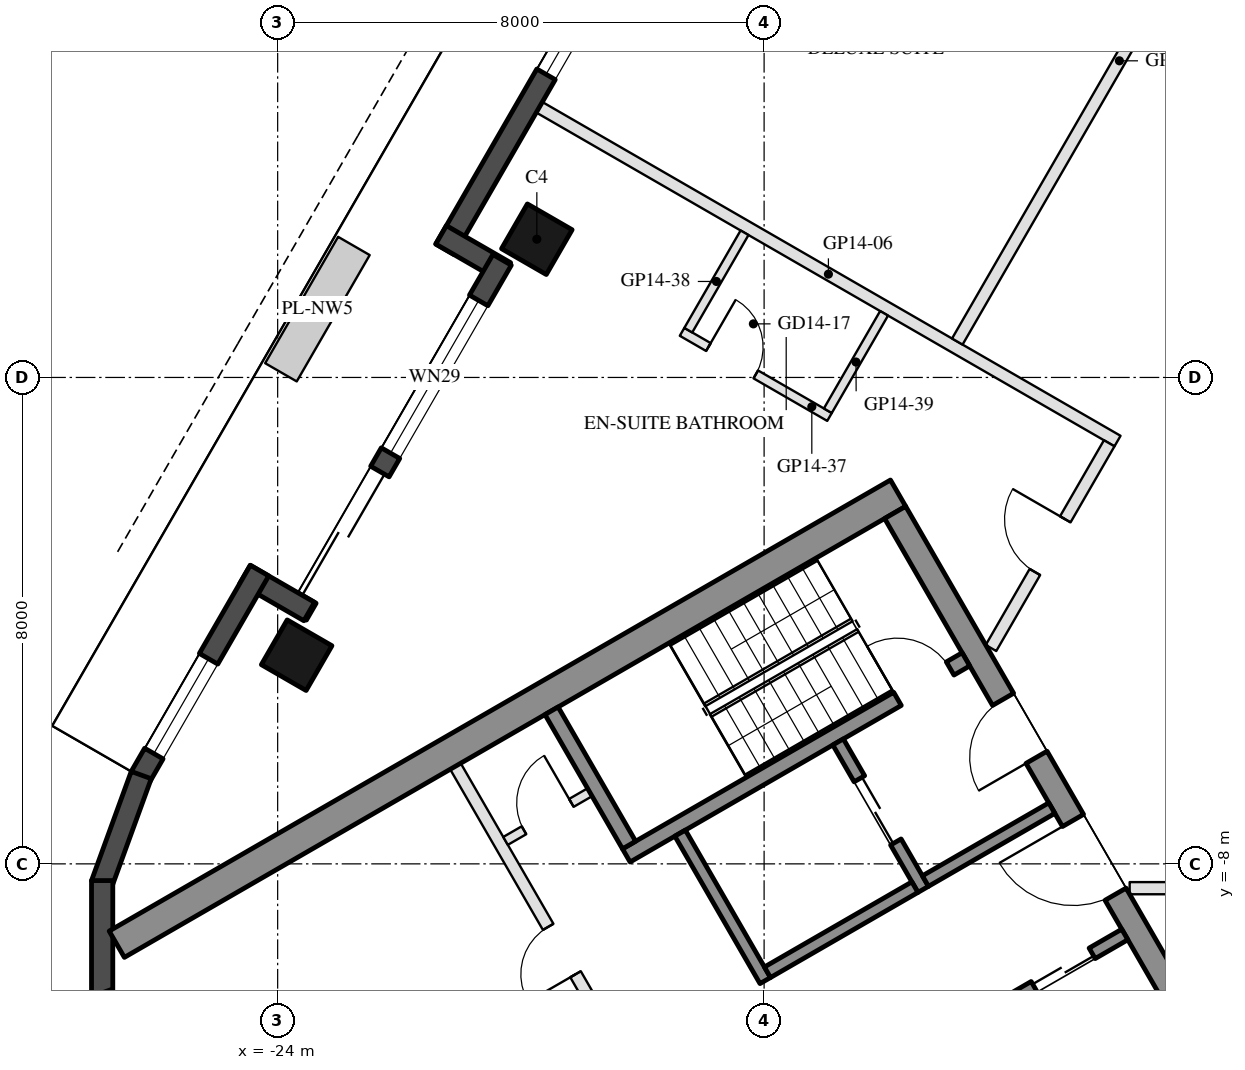
"""IFC4 building model, lengths in metres.
Left out: names, types, materials, properties, quantities, classifications, styles, units other than length and angle.
Written with IfcOpenShell. Run it as: python <this file> out.ifc"""

import sys

from ifc_helpers import new_model, si_unit, direction, frame, frame_2d, origin, origin_2d, place, context, subcontext, project, spatial, rectangle, hollow_rectangle, extrude, element, fill, save


model = new_model("IFC4")
c1 = context("Model", 3, precision=1e-05, world=origin(), true_north=direction((0.0, 1.0)))
c2 = subcontext(c1, "Body", "Model", "MODEL_VIEW")
j1 = project(units=[si_unit("LENGTHUNIT", "METRE"), si_unit("PLANEANGLEUNIT", "RADIAN")], contexts=[c1])
p1 = place(None, origin())
s1 = spatial("IfcSite", under=j1, at=p1, CompositionType="ELEMENT")
p2 = place(p1, origin())
s2 = spatial("IfcBuilding", under=s1, at=p2, CompositionType="ELEMENT")
p3 = place(p2, frame((0.0, 0.0, 161.4)))
s3 = spatial("IfcBuildingStorey", under=s2, at=p3, CompositionType="ELEMENT", Elevation=161.4)
for number, where, z_axis, x_axis in (
    (1, (-19.738, 2.273, 0.0), (0.0, 0.0, 1.0), (0.5, 0.866, 0.0)),
    (2, (-23.688, -4.568, 0.0), (0.0, 0.0, 1.0), (0.5, 0.866, 0.0)),
):
    element("IfcColumn", number, at=place(p3, frame(where, z_axis=z_axis, x_axis=x_axis)), inside=s3, PredefinedType="COLUMN", context=c2, shape_type="SweptSolid", body=[
        extrude(hollow_rectangle(XDim=0.85, YDim=0.85, WallThickness=0.04, at=origin_2d()), origin(), (0.0, 0.0, 1.0), 3.7),
    ])
p4 = place(p3, frame((-16.398, 10.507, 0.0), z_axis=(0.0, 0.0, 1.0), x_axis=(-0.499999142773, -0.866025898704, 0.0)))
e3 = element("IfcWall", 3, at=p4, inside=s3, PredefinedType="SOLIDWALL", context=c2, shape_type="SweptSolid", body=[
    extrude(rectangle(XDim=9.7, YDim=0.35, at=frame_2d((4.85, 0.0))), origin(), (0.0, 0.0, 1.0), 3.55),
])
p5 = place(p4, frame((1.675, 0.0, 0.0)))
e4 = element("IfcOpeningElement", 4, at=p5, cuts=e3, PredefinedType="OPENING", context=c2, shape_type="SweptSolid", body=[
    extrude(rectangle(XDim=2.4, YDim=2.4, at=frame_2d((1.2, 1.2))), frame((0.0, 0.185, 0.0), z_axis=(0.0, -1.0, 0.0), x_axis=(1.0, 0.0, 0.0)), (0.0, 0.0, 1.0), 0.37),
])
p6 = place(p4, frame((4.375, 0.0, 0.3)))
e5 = element("IfcOpeningElement", 5, at=p6, cuts=e3, PredefinedType="OPENING", context=c2, shape_type="SweptSolid", body=[
    extrude(rectangle(XDim=2.0, YDim=2.65, at=frame_2d((1.0, 1.325))), frame((0.0, 0.185, 0.0), z_axis=(0.0, -1.0, 0.0), x_axis=(1.0, 0.0, 0.0)), (0.0, 0.0, 1.0), 0.37),
])
p7 = place(p3, frame((-21.312, 2.346, 0.0), z_axis=(0.0, 0.0, 1.0), x_axis=(0.866005645448, -0.500034220881, 0.0)))
e6 = element("IfcWall", 6, at=p7, inside=s3, PredefinedType="SOLIDWALL", context=c2, shape_type="SweptSolid", body=[
    extrude(rectangle(XDim=1.22, YDim=0.35, at=frame_2d((0.61, 0.0))), origin(), (0.0, 0.0, 1.0), 3.55),
])
p8 = place(p3, frame((-20.309, 1.934, 0.0), z_axis=(0.0, 0.0, 1.0), x_axis=(-0.499992114976, -0.866029956157, 0.0)))
e7 = element("IfcWall", 7, at=p8, inside=s3, PredefinedType="SOLIDWALL", context=c2, shape_type="SweptSolid", body=[
    extrude(rectangle(XDim=6.74, YDim=0.35, at=frame_2d((3.37, 0.0))), origin(), (0.0, 0.0, 1.0), 3.55),
])
p9 = place(p8, frame((4.02, 0.0, 0.0)))
e8 = element("IfcOpeningElement", 8, at=p9, cuts=e7, PredefinedType="OPENING", context=c2, shape_type="SweptSolid", body=[
    extrude(rectangle(XDim=2.4, YDim=2.4, at=frame_2d((1.2, 1.2))), frame((0.0, 0.185, 0.0), z_axis=(0.0, -1.0, 0.0), x_axis=(1.0, 0.0, 0.0)), (0.0, 0.0, 1.0), 0.37),
])
p10 = place(p8, frame((0.77, 0.0, 0.3)))
e9 = element("IfcOpeningElement", 9, at=p10, cuts=e7, PredefinedType="OPENING", context=c2, shape_type="SweptSolid", body=[
    extrude(rectangle(XDim=2.9, YDim=2.65, at=frame_2d((1.45, 1.325))), frame((0.0, 0.185, 0.0), z_axis=(0.0, -1.0, 0.0), x_axis=(1.0, 0.0, 0.0)), (0.0, 0.0, 1.0), 0.37),
])
p11 = place(p3, frame((-23.481, -3.85, 0.0), z_axis=(0.0, 0.0, 1.0), x_axis=(-0.866092288191, 0.499884134912, 0.0)))
e10 = element("IfcWall", 10, at=p11, inside=s3, PredefinedType="SOLIDWALL", context=c2, shape_type="SweptSolid", body=[
    extrude(rectangle(XDim=1.22, YDim=0.35, at=frame_2d((0.61, 0.0))), origin(), (0.0, 0.0, 1.0), 3.55),
])
p12 = place(p3, frame((-24.299, -3.176, 0.0), z_axis=(0.0, 0.0, 1.0), x_axis=(-0.500028278809, -0.866009076391, 0.0)))
e11 = element("IfcWall", 11, at=p12, inside=s3, PredefinedType="SOLIDWALL", context=c2, shape_type="SweptSolid", body=[
    extrude(rectangle(XDim=3.916, YDim=0.35, at=frame_2d((1.958, 0.0))), origin(), (0.0, 0.0, 1.0), 3.55),
])
p13 = place(p12, frame((1.675, 0.0, 0.3)))
e12 = element("IfcOpeningElement", 12, at=p13, cuts=e11, PredefinedType="OPENING", context=c2, shape_type="SweptSolid", body=[
    extrude(rectangle(XDim=1.8, YDim=2.65, at=frame_2d((0.9, 1.325))), frame((0.0, 0.185, 0.0), z_axis=(0.0, -1.0, 0.0), x_axis=(1.0, 0.0, 0.0)), (0.0, 0.0, 1.0), 0.37),
])
for number, where, z_axis, x_axis in (
    (13, (-26.244, -6.54, 0.0), (0.0, 0.0, 1.0), (-0.342, -0.94, 0.0)),
    (14, (-26.886, -8.275, 0.0), (0.0, 0.0, 1.0), (0.0, -1.0, 0.0)),
    (15, (-26.897, -10.125, 0.0), (0.0, 0.0, 1.0), (0.342, -0.94, 0.0)),
):
    element("IfcWall", number, at=place(p3, frame(where, z_axis=z_axis, x_axis=x_axis)), inside=s3, PredefinedType="SOLIDWALL", context=c2, shape_type="SweptSolid", body=[
        extrude(rectangle(XDim=1.91, YDim=0.35, at=frame_2d((0.955, 0.0))), origin(), (0.0, 0.0, 1.0), 3.55),
    ])
p14 = place(p3, frame((-13.797, -1.903, 0.0), z_axis=(0.0, 0.0, 1.0), x_axis=(-0.866025009528, -0.500000682871, 0.0)))
e16 = element("IfcWall", 16, at=p14, inside=s3, PredefinedType="SHEAR", context=c2, shape_type="SweptSolid", body=[
    extrude(rectangle(XDim=14.837, YDim=0.5, at=frame_2d((7.418, 0.0))), origin(), (0.0, 0.0, 1.0), 3.5),
])
p15 = place(p3, frame((-13.845, -2.22, 0.0), z_axis=(0.0, 0.0, 1.0), x_axis=(0.500004234368, -0.866022959057, 0.0)))
e17 = element("IfcWall", 17, at=p15, inside=s3, PredefinedType="SHEAR", context=c2, shape_type="SweptSolid", body=[
    extrude(rectangle(XDim=10.0, YDim=0.4, at=frame_2d((5.0, 0.0))), origin(), (0.0, 0.0, 1.0), 3.5),
])
p16 = place(p15, frame((3.55, 0.0, 0.0)))
e18 = element("IfcOpeningElement", 18, at=p16, cuts=e17, PredefinedType="OPENING", context=c2, shape_type="SweptSolid", body=[
    extrude(rectangle(XDim=1.1, YDim=2.1, at=frame_2d((0.55, 1.05))), frame((0.0, 0.21, 0.0), z_axis=(0.0, -1.0, 0.0), x_axis=(1.0, 0.0, 0.0)), (0.0, 0.0, 1.0), 0.42),
])
p17 = place(p15, frame((5.85, 0.0, 0.0)))
e19 = element("IfcOpeningElement", 19, at=p17, cuts=e17, PredefinedType="OPENING", context=c2, shape_type="SweptSolid", body=[
    extrude(rectangle(XDim=1.4, YDim=2.1, at=frame_2d((0.7, 1.05))), frame((0.0, 0.21, 0.0), z_axis=(0.0, -1.0, 0.0), x_axis=(1.0, 0.0, 0.0)), (0.0, 0.0, 1.0), 0.42),
])
p18 = place(p3, frame((-12.681, -4.636, 0.0), z_axis=(0.0, 0.0, 1.0), x_axis=(-0.866021702275, -0.500006411147, 0.0)))
e20 = element("IfcWall", 20, at=p18, inside=s3, PredefinedType="SHEAR", context=c2, shape_type="SweptSolid", body=[
    extrude(rectangle(XDim=6.45, YDim=0.25, at=frame_2d((3.225, 0.0))), origin(), (0.0, 0.0, 1.0), 3.5),
])
p19 = place(p18, frame((0.3, 0.0, 0.0)))
e21 = element("IfcOpeningElement", 21, at=p19, cuts=e20, PredefinedType="OPENING", context=c2, shape_type="SweptSolid", body=[
    extrude(rectangle(XDim=1.0, YDim=2.1, at=frame_2d((0.5, 1.05))), frame((0.0, 0.135, 0.0), z_axis=(0.0, -1.0, 0.0), x_axis=(1.0, 0.0, 0.0)), (0.0, 0.0, 1.0), 0.27),
])
p20 = place(p3, frame((-19.496, -5.482, 0.0), z_axis=(0.0, 0.0, 1.0), x_axis=(0.499990435942, -0.866030925526, 0.0)))
e22 = element("IfcWall", 22, at=p20, inside=s3, PredefinedType="SHEAR", context=c2, shape_type="SweptSolid", body=[
    extrude(rectangle(XDim=2.55, YDim=0.25, at=frame_2d((1.275, 0.0))), origin(), (0.0, 0.0, 1.0), 3.5),
])
p21 = place(p3, frame((-17.381, -7.495, 0.0), z_axis=(0.0, 0.0, 1.0), x_axis=(0.500011755427, -0.866018616679, 0.0)))
e23 = element("IfcWall", 23, at=p21, inside=s3, PredefinedType="SHEAR", context=c2, shape_type="SweptSolid", body=[
    extrude(rectangle(XDim=2.8, YDim=0.2, at=frame_2d((1.4, 0.0))), origin(), (0.0, 0.0, 1.0), 3.5),
])
p22 = place(p3, frame((-14.783, -5.995, 0.0), z_axis=(0.0, 0.0, 1.0), x_axis=(0.49994636267, -0.866056369097, 0.0)))
e24 = element("IfcWall", 24, at=p22, inside=s3, PredefinedType="SHEAR", context=c2, shape_type="SweptSolid", body=[
    extrude(rectangle(XDim=2.8, YDim=0.2, at=frame_2d((1.4, 0.0))), origin(), (0.0, 0.0, 1.0), 3.5),
])
p23 = place(p22, frame((0.7, 0.0, 0.0)))
e25 = element("IfcOpeningElement", 25, at=p23, cuts=e24, PredefinedType="OPENING", context=c2, shape_type="SweptSolid", body=[
    extrude(rectangle(XDim=1.2, YDim=2.1, at=frame_2d((0.6, 1.05))), frame((0.0, 0.11, 0.0), z_axis=(0.0, -1.0, 0.0), x_axis=(1.0, 0.0, 0.0)), (0.0, 0.0, 1.0), 0.22),
])
p24 = place(p3, frame((-13.52, -8.383, 0.0), z_axis=(0.0, 0.0, 1.0), x_axis=(-0.866034573852, -0.49998411664, 0.0)))
e26 = element("IfcWall", 26, at=p24, inside=s3, PredefinedType="SHEAR", context=c2, shape_type="SweptSolid", body=[
    extrude(rectangle(XDim=2.8, YDim=0.2, at=frame_2d((1.4, 0.0))), origin(), (0.0, 0.0, 1.0), 3.5),
])
p25 = place(p3, frame((-11.268, -7.083, 0.0), z_axis=(0.0, 0.0, 1.0), x_axis=(-0.866050077142, -0.499957262057, 0.0)))
e27 = element("IfcWall", 27, at=p25, inside=s3, PredefinedType="SHEAR", context=c2, shape_type="SweptSolid", body=[
    extrude(rectangle(XDim=2.4, YDim=0.2, at=frame_2d((1.2, 0.0))), origin(), (0.0, 0.0, 1.0), 3.5),
])
p26 = place(p3, frame((-10.068, -9.162, 0.0), z_axis=(0.0, 0.0, 1.0), x_axis=(-0.866032725843, -0.499987317609, 0.0)))
e28 = element("IfcWall", 28, at=p26, inside=s3, PredefinedType="SHEAR", context=c2, shape_type="SweptSolid", body=[
    extrude(rectangle(XDim=10.16, YDim=0.2, at=frame_2d((5.08, 0.0))), origin(), (0.0, 0.0, 1.0), 3.5),
])
p27 = place(p26, frame((0.62, 0.0, 0.0)))
e29 = element("IfcOpeningElement", 29, at=p27, cuts=e28, PredefinedType="OPENING", context=c2, shape_type="SweptSolid", body=[
    extrude(rectangle(XDim=1.1, YDim=2.1, at=frame_2d((0.55, 1.05))), frame((0.0, 0.11, 0.0), z_axis=(0.0, -1.0, 0.0), x_axis=(1.0, 0.0, 0.0)), (0.0, 0.0, 1.0), 0.22),
])
p28 = place(p26, frame((3.16, 0.0, 0.0)))
e30 = element("IfcOpeningElement", 30, at=p28, cuts=e28, PredefinedType="OPENING", context=c2, shape_type="SweptSolid", body=[
    extrude(rectangle(XDim=1.1, YDim=2.1, at=frame_2d((0.55, 1.05))), frame((0.0, 0.11, 0.0), z_axis=(0.0, -1.0, 0.0), x_axis=(1.0, 0.0, 0.0)), (0.0, 0.0, 1.0), 0.22),
])
p29 = place(p26, frame((5.7, 0.0, 0.0)))
e31 = element("IfcOpeningElement", 31, at=p29, cuts=e28, PredefinedType="OPENING", context=c2, shape_type="SweptSolid", body=[
    extrude(rectangle(XDim=1.1, YDim=2.1, at=frame_2d((0.55, 1.05))), frame((0.0, 0.11, 0.0), z_axis=(0.0, -1.0, 0.0), x_axis=(1.0, 0.0, 0.0)), (0.0, 0.0, 1.0), 0.22),
])
p30 = place(p26, frame((8.24, 0.0, 0.0)))
e32 = element("IfcOpeningElement", 32, at=p30, cuts=e28, PredefinedType="OPENING", context=c2, shape_type="SweptSolid", body=[
    extrude(rectangle(XDim=1.1, YDim=2.1, at=frame_2d((0.55, 1.05))), frame((0.0, 0.11, 0.0), z_axis=(0.0, -1.0, 0.0), x_axis=(1.0, 0.0, 0.0)), (0.0, 0.0, 1.0), 0.22),
])
p31 = place(p3, frame((-21.076, -6.395, 0.0), z_axis=(0.0, 0.0, 1.0), x_axis=(0.50001468107, -0.866016927499, 0.0)))
e33 = element("IfcWall", 33, at=p31, inside=s3, PredefinedType="PARTITIONING", context=c2, shape_type="SweptSolid", body=[
    extrude(rectangle(XDim=5.4, YDim=0.2, at=frame_2d((2.7, 0.0))), origin(), (0.0, 0.0, 1.0), 3.5),
])
p32 = place(p31, frame((3.05, 0.0, 0.0)))
e34 = element("IfcOpeningElement", 34, at=p32, cuts=e33, PredefinedType="OPENING", context=c2, shape_type="SweptSolid", body=[
    extrude(rectangle(XDim=0.9, YDim=2.1, at=frame_2d((0.45, 1.05))), frame((0.0, 0.11, 0.0), z_axis=(0.0, -1.0, 0.0), x_axis=(1.0, 0.0, 0.0)), (0.0, 0.0, 1.0), 0.22),
])
p33 = place(p3, frame((-18.866, -6.822, 0.0), z_axis=(0.0, 0.0, 1.0), x_axis=(-0.866028054938, -0.499995408039, 0.0)))
e35 = element("IfcWall", 35, at=p33, inside=s3, PredefinedType="PARTITIONING", context=c2, shape_type="SweptSolid", body=[
    extrude(rectangle(XDim=1.6, YDim=0.15, at=frame_2d((0.8, 0.0))), origin(), (0.0, 0.0, 1.0), 3.5),
])
p34 = place(p33, frame((0.35, 0.0, 0.0)))
e36 = element("IfcOpeningElement", 36, at=p34, cuts=e35, PredefinedType="OPENING", context=c2, shape_type="SweptSolid", body=[
    extrude(rectangle(XDim=0.9, YDim=2.1, at=frame_2d((0.45, 1.05))), frame((0.0, 0.085, 0.0), z_axis=(0.0, -1.0, 0.0), x_axis=(1.0, 0.0, 0.0)), (0.0, 0.0, 1.0), 0.17),
])
p35 = place(p3, frame((-19.697, 4.444, 0.0), z_axis=(0.0, 0.0, 1.0), x_axis=(0.866027479907, -0.499996404033, 0.0)))
e37 = element("IfcWall", 37, at=p35, inside=s3, PredefinedType="PARTITIONING", context=c2, shape_type="SweptSolid", body=[
    extrude(rectangle(XDim=10.98, YDim=0.2, at=frame_2d((5.49, 0.0))), origin(), (0.0, 0.0, 1.0), 3.06),
])
p36 = place(p3, frame((-6.112, -8.4, 0.0), z_axis=(0.0, 0.0, 1.0), x_axis=(-1.0, 0.0, 0.0)))
e38 = element("IfcWall", 38, at=p36, inside=s3, PredefinedType="PARTITIONING", context=c2, shape_type="SweptSolid", body=[
    extrude(rectangle(XDim=3.876, YDim=0.2, at=frame_2d((1.938, 0.0))), origin(), (0.0, 0.0, 1.0), 2.95),
])
p37 = place(p36, frame((1.438, 0.0, 0.0)))
e39 = element("IfcOpeningElement", 39, at=p37, cuts=e38, PredefinedType="OPENING", context=c2, shape_type="SweptSolid", body=[
    extrude(rectangle(XDim=1.0, YDim=2.1, at=frame_2d((0.5, 1.05))), frame((0.0, 0.11, 0.0), z_axis=(0.0, -1.0, 0.0), x_axis=(1.0, 0.0, 0.0)), (0.0, 0.0, 1.0), 0.22),
])
p38 = place(p3, frame((-12.823, 0.591, 0.0), z_axis=(0.0, 0.0, 1.0), x_axis=(0.500005210312, 0.866022395588, 0.0)))
e40 = element("IfcWall", 40, at=p38, inside=s3, PredefinedType="PARTITIONING", context=c2, shape_type="SweptSolid", body=[
    extrude(rectangle(XDim=10.663, YDim=0.2, at=frame_2d((5.332, 0.0))), origin(), (0.0, 0.0, 1.0), 2.95),
])
p39 = place(p38, frame((7.201, 0.0, 0.0)))
e41 = element("IfcOpeningElement", 41, at=p39, cuts=e40, PredefinedType="OPENING", context=c2, shape_type="SweptSolid", body=[
    extrude(rectangle(XDim=1.0, YDim=2.1, at=frame_2d((0.5, 1.05))), frame((0.0, 0.11, 0.0), z_axis=(0.0, -1.0, 0.0), x_axis=(1.0, 0.0, 0.0)), (0.0, 0.0, 1.0), 0.22),
])
p40 = place(p3, frame((-12.269, -4.45, 0.0), z_axis=(0.0, 0.0, 1.0), x_axis=(0.500008716408, 0.866020371305, 0.0)))
e42 = element("IfcWall", 42, at=p40, inside=s3, PredefinedType="PARTITIONING", context=c2, shape_type="SweptSolid", body=[
    extrude(rectangle(XDim=3.888, YDim=0.2, at=frame_2d((1.944, 0.0))), origin(), (0.0, 0.0, 1.0), 2.95),
])
p41 = place(p40, frame((1.444, 0.0, 0.0)))
e43 = element("IfcOpeningElement", 43, at=p41, cuts=e42, PredefinedType="OPENING", context=c2, shape_type="SweptSolid", body=[
    extrude(rectangle(XDim=1.0, YDim=2.1, at=frame_2d((0.5, 1.05))), frame((0.0, 0.11, 0.0), z_axis=(0.0, -1.0, 0.0), x_axis=(1.0, 0.0, 0.0)), (0.0, 0.0, 1.0), 0.22),
])
p42 = place(p3, frame((-17.349, 0.75, 0.0), z_axis=(0.0, 0.0, 1.0), x_axis=(0.866056369097, -0.49994636267, 0.0)))
e44 = element("IfcWall", 44, at=p42, inside=s3, PredefinedType="PARTITIONING", context=c2, shape_type="SweptSolid", body=[
    extrude(rectangle(XDim=2.8, YDim=0.15, at=frame_2d((1.4, 0.0))), origin(), (0.0, 0.0, 1.0), 2.95),
])
p43 = place(p42, frame((0.5, 0.0, 0.0)))
e45 = element("IfcOpeningElement", 45, at=p43, cuts=e44, PredefinedType="OPENING", context=c2, shape_type="SweptSolid", body=[
    extrude(rectangle(XDim=0.9, YDim=2.1, at=frame_2d((0.45, 1.05))), frame((0.0, 0.085, 0.0), z_axis=(0.0, -1.0, 0.0), x_axis=(1.0, 0.0, 0.0)), (0.0, 0.0, 1.0), 0.17),
])
for number, where, z_axis, x_axis in (
    (46, (-16.322, 2.38, 0.0), (0.0, 0.0, 1.0), (-0.5, -0.866, 0.0)),
    (47, (-14.027, 1.055, 0.0), (0.0, 0.0, 1.0), (-0.5, -0.866, 0.0)),
):
    element("IfcWall", number, at=place(p3, frame(where, z_axis=z_axis, x_axis=x_axis)), inside=s3, PredefinedType="PARTITIONING", context=c2, shape_type="SweptSolid", body=[
        extrude(rectangle(XDim=1.85, YDim=0.15, at=frame_2d((0.925, 0.0))), origin(), (0.0, 0.0, 1.0), 2.95),
    ])
p44 = place(p6, origin())
e48 = element("IfcWindow", 48, at=p44, inside=s3, PartitioningType="SINGLE_PANEL", PredefinedType="WINDOW", context=c2, shape_type="SweptSolid", body=[
    extrude(rectangle(XDim=2.0, YDim=2.65, at=frame_2d((1.0, 1.325))), frame((0.0, 0.03, 0.0), z_axis=(0.0, -1.0, 0.0), x_axis=(1.0, 0.0, 0.0)), (0.0, 0.0, 1.0), 0.06),
])
fill(e5, e48)
p45 = place(p9, frame((2.4, 0.0, 0.0), z_axis=(0.0, 0.0, 1.0), x_axis=(-1.0, 0.0, 0.0)))
e49 = element("IfcDoor", 49, at=p45, inside=s3, OperationType="SLIDING_TO_LEFT", PredefinedType="DOOR", context=c2, shape_type="SweptSolid", body=[
    extrude(rectangle(XDim=2.4, YDim=2.4, at=frame_2d((1.2, 1.2))), frame((0.0, 0.025, 0.0), z_axis=(0.0, -1.0, 0.0), x_axis=(1.0, 0.0, 0.0)), (0.0, 0.0, 1.0), 0.05),
])
fill(e8, e49)
p46 = place(p10, origin())
e50 = element("IfcWindow", 50, at=p46, inside=s3, PartitioningType="SINGLE_PANEL", PredefinedType="WINDOW", context=c2, shape_type="SweptSolid", body=[
    extrude(rectangle(XDim=2.9, YDim=2.65, at=frame_2d((1.45, 1.325))), frame((0.0, 0.03, 0.0), z_axis=(0.0, -1.0, 0.0), x_axis=(1.0, 0.0, 0.0)), (0.0, 0.0, 1.0), 0.06),
])
fill(e9, e50)
p47 = place(p13, origin())
e51 = element("IfcWindow", 51, at=p47, inside=s3, PartitioningType="SINGLE_PANEL", PredefinedType="WINDOW", context=c2, shape_type="SweptSolid", body=[
    extrude(rectangle(XDim=1.8, YDim=2.65, at=frame_2d((0.9, 1.325))), frame((0.0, 0.03, 0.0), z_axis=(0.0, -1.0, 0.0), x_axis=(1.0, 0.0, 0.0)), (0.0, 0.0, 1.0), 0.06),
])
fill(e12, e51)
p48 = place(p23, origin())
e52 = element("IfcDoor", 52, at=p48, inside=s3, OperationType="DOUBLE_DOOR_SLIDING", PredefinedType="DOOR", context=c2, shape_type="SweptSolid", body=[
    extrude(rectangle(XDim=1.2, YDim=2.1, at=frame_2d((0.6, 1.05))), frame((0.0, 0.025, 0.0), z_axis=(0.0, -1.0, 0.0), x_axis=(1.0, 0.0, 0.0)), (0.0, 0.0, 1.0), 0.05),
])
fill(e25, e52)
p49 = place(p34, frame((0.9, 0.0, 0.0), z_axis=(0.0, 0.0, 1.0), x_axis=(-1.0, 0.0, 0.0)))
e53 = element("IfcDoor", 53, at=p49, inside=s3, OperationType="SINGLE_SWING_RIGHT", PredefinedType="DOOR", context=c2, shape_type="SweptSolid", body=[
    extrude(rectangle(XDim=0.9, YDim=2.1, at=frame_2d((0.45, 1.05))), frame((0.0, 0.025, 0.0), z_axis=(0.0, -1.0, 0.0), x_axis=(1.0, 0.0, 0.0)), (0.0, 0.0, 1.0), 0.05),
])
fill(e36, e53)
p50 = place(p27, origin())
e54 = element("IfcDoor", 54, at=p50, inside=s3, OperationType="DOUBLE_DOOR_SLIDING", PredefinedType="DOOR", context=c2, shape_type="SweptSolid", body=[
    extrude(rectangle(XDim=1.1, YDim=2.1, at=frame_2d((0.55, 1.05))), frame((0.0, 0.025, 0.0), z_axis=(0.0, -1.0, 0.0), x_axis=(1.0, 0.0, 0.0)), (0.0, 0.0, 1.0), 0.05),
])
fill(e29, e54)
p51 = place(p32, frame((0.9, 0.0, 0.0), z_axis=(0.0, 0.0, 1.0), x_axis=(-1.0, 0.0, 0.0)))
e55 = element("IfcDoor", 55, at=p51, inside=s3, OperationType="SINGLE_SWING_LEFT", PredefinedType="DOOR", context=c2, shape_type="SweptSolid", body=[
    extrude(rectangle(XDim=0.9, YDim=2.1, at=frame_2d((0.45, 1.05))), frame((0.0, 0.025, 0.0), z_axis=(0.0, -1.0, 0.0), x_axis=(1.0, 0.0, 0.0)), (0.0, 0.0, 1.0), 0.05),
])
fill(e34, e55)
p52 = place(p16, frame((1.1, 0.0, 0.0), z_axis=(0.0, 0.0, 1.0), x_axis=(-1.0, 0.0, 0.0)))
e56 = element("IfcDoor", 56, at=p52, inside=s3, OperationType="SINGLE_SWING_LEFT", PredefinedType="DOOR", context=c2, shape_type="SweptSolid", body=[
    extrude(rectangle(XDim=1.1, YDim=2.1, at=frame_2d((0.55, 1.05))), frame((0.0, 0.025, 0.0), z_axis=(0.0, -1.0, 0.0), x_axis=(1.0, 0.0, 0.0)), (0.0, 0.0, 1.0), 0.05),
])
fill(e18, e56)
p53 = place(p17, frame((1.4, 0.0, 0.0), z_axis=(0.0, 0.0, 1.0), x_axis=(-1.0, 0.0, 0.0)))
e57 = element("IfcDoor", 57, at=p53, inside=s3, OperationType="DOUBLE_DOOR_SINGLE_SWING", PredefinedType="DOOR", context=c2, shape_type="SweptSolid", body=[
    extrude(rectangle(XDim=1.4, YDim=2.1, at=frame_2d((0.7, 1.05))), frame((0.0, 0.025, 0.0), z_axis=(0.0, -1.0, 0.0), x_axis=(1.0, 0.0, 0.0)), (0.0, 0.0, 1.0), 0.05),
])
fill(e19, e57)
p54 = place(p19, frame((1.0, 0.0, 0.0), z_axis=(0.0, 0.0, 1.0), x_axis=(-1.0, 0.0, 0.0)))
e58 = element("IfcDoor", 58, at=p54, inside=s3, OperationType="SINGLE_SWING_LEFT", PredefinedType="DOOR", context=c2, shape_type="SweptSolid", body=[
    extrude(rectangle(XDim=1.0, YDim=2.1, at=frame_2d((0.5, 1.05))), frame((0.0, 0.025, 0.0), z_axis=(0.0, -1.0, 0.0), x_axis=(1.0, 0.0, 0.0)), (0.0, 0.0, 1.0), 0.05),
])
fill(e21, e58)
p55 = place(p43, origin())
e59 = element("IfcDoor", 59, at=p55, inside=s3, OperationType="SINGLE_SWING_LEFT", PredefinedType="DOOR", context=c2, shape_type="SweptSolid", body=[
    extrude(rectangle(XDim=0.9, YDim=2.1, at=frame_2d((0.45, 1.05))), frame((0.0, 0.025, 0.0), z_axis=(0.0, -1.0, 0.0), x_axis=(1.0, 0.0, 0.0)), (0.0, 0.0, 1.0), 0.05),
])
fill(e45, e59)
p56 = place(p41, origin())
e60 = element("IfcDoor", 60, at=p56, inside=s3, OperationType="SINGLE_SWING_RIGHT", PredefinedType="DOOR", context=c2, shape_type="SweptSolid", body=[
    extrude(rectangle(XDim=1.0, YDim=2.1, at=frame_2d((0.5, 1.05))), frame((0.0, 0.025, 0.0), z_axis=(0.0, -1.0, 0.0), x_axis=(1.0, 0.0, 0.0)), (0.0, 0.0, 1.0), 0.05),
])
fill(e43, e60)
save(model, sys.argv[1])
